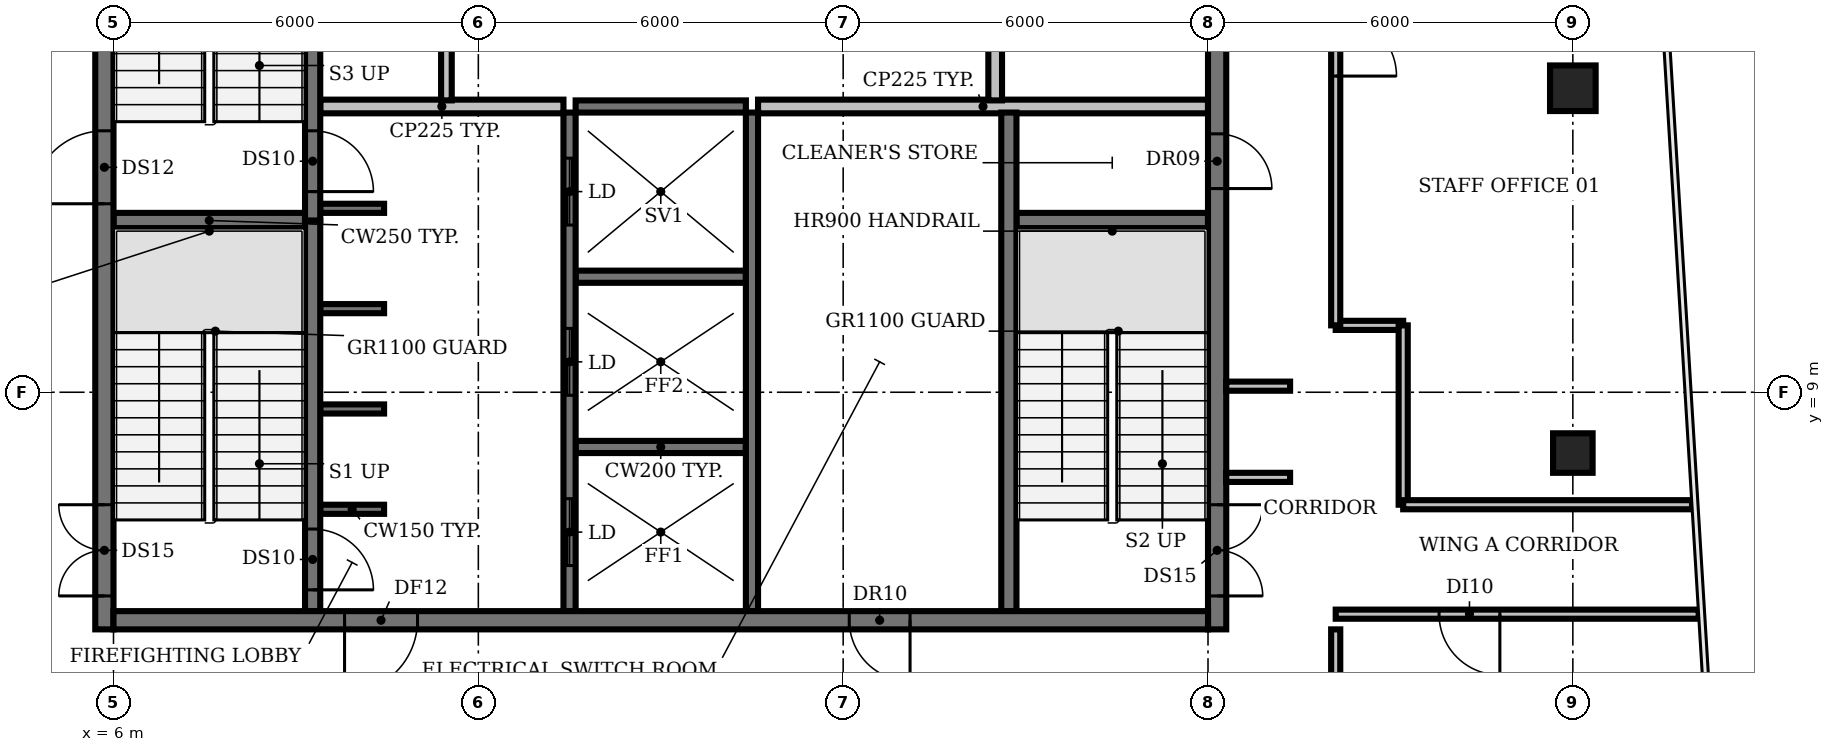
"""IFC4 building model, lengths in metres.
Left out: names, types, materials, properties, quantities, classifications, styles, units other than length and angle.
Written with IfcOpenShell. Run it as: python <this file> out.ifc"""

import sys

from ifc_helpers import new_model, si_unit, direction, frame, frame_2d, origin, origin_2d, place, context, subcontext, project, spatial, rectangle, circle, extrude, element, fill, save


model = new_model("IFC4")
c1 = context("Model", 3, precision=1e-05, world=origin(), true_north=direction((0.0, 1.0)))
c2 = subcontext(c1, "Body", "Model", "MODEL_VIEW")
j1 = project(units=[si_unit("LENGTHUNIT", "METRE"), si_unit("PLANEANGLEUNIT", "RADIAN")], contexts=[c1])
p1 = place(None, origin())
s1 = spatial("IfcSite", under=j1, at=p1, CompositionType="ELEMENT")
p2 = place(p1, origin())
s2 = spatial("IfcBuilding", under=s1, at=p2, CompositionType="ELEMENT")
p3 = place(p2, frame((0.0, 0.0, 318.8)))
s3 = spatial("IfcBuildingStorey", under=s2, at=p3, CompositionType="ELEMENT", Elevation=318.8)
p4 = place(p3, frame((30.0, 8.0, 0.0), z_axis=(0.0, 0.0, 1.0), x_axis=(1.0, 0.0, 0.0)))
e1 = element("IfcColumn", 1, at=p4, inside=s3, PredefinedType="COLUMN", context=c2, shape_type="SweptSolid", body=[
    extrude(rectangle(XDim=0.65, YDim=0.65, at=origin_2d()), origin(), (0.0, 0.0, 1.0), 3.9),
])
p5 = place(p3, frame((30.0, 14.0, 0.0), z_axis=(0.0, 0.0, 1.0), x_axis=(1.0, 0.0, 0.0)))
e2 = element("IfcColumn", 2, at=p5, inside=s3, PredefinedType="COLUMN", context=c2, shape_type="SweptSolid", body=[
    extrude(circle(Radius=0.375, at=origin_2d()), origin(), (0.0, 0.0, 1.0), 3.9),
])
p6 = place(p3, frame((9.4, 7.075, 0.0), z_axis=(0.0, 0.0, 1.0), x_axis=(1.0, 0.0, 0.0)))
e3 = element("IfcWall", 3, at=p6, inside=s3, PredefinedType="SHEAR", context=c2, shape_type="SweptSolid", body=[
    extrude(rectangle(XDim=1.05, YDim=0.15, at=frame_2d((0.525, 0.0))), origin(), (0.0, 0.0, 1.0), 3.9),
])
p7 = place(p3, frame((13.6, 8.1, 0.0), z_axis=(0.0, 0.0, 1.0), x_axis=(1.0, 0.0, 0.0)))
e4 = element("IfcWall", 4, at=p7, inside=s3, PredefinedType="SHEAR", context=c2, shape_type="SweptSolid", body=[
    extrude(rectangle(XDim=2.8, YDim=0.2, at=frame_2d((1.4, 0.0))), origin(), (0.0, 0.0, 1.0), 3.9),
])
for number, where, z_axis, x_axis in (
    (5, (9.4, 8.725, 0.0), (0.0, 0.0, 1.0), (1.0, 0.0, 0.0)),
    (6, (9.4, 10.375, 0.0), (0.0, 0.0, 1.0), (1.0, 0.0, 0.0)),
):
    element("IfcWall", number, at=place(p3, frame(where, z_axis=z_axis, x_axis=x_axis)), inside=s3, PredefinedType="SHEAR", context=c2, shape_type="SweptSolid", body=[
        extrude(rectangle(XDim=1.05, YDim=0.15, at=frame_2d((0.525, 0.0))), origin(), (0.0, 0.0, 1.0), 3.9),
    ])
p8 = place(p3, frame((13.6, 10.9, 0.0), z_axis=(0.0, 0.0, 1.0), x_axis=(1.0, 0.0, 0.0)))
e7 = element("IfcWall", 7, at=p8, inside=s3, PredefinedType="SHEAR", context=c2, shape_type="SweptSolid", body=[
    extrude(rectangle(XDim=2.8, YDim=0.2, at=frame_2d((1.4, 0.0))), origin(), (0.0, 0.0, 1.0), 3.9),
])
for number, where, z_axis, x_axis in (
    (8, (6.0, 11.825, 0.0), (0.0, 0.0, 1.0), (1.0, 0.0, 0.0)),
    (9, (20.85, 11.825, 0.0), (0.0, 0.0, 1.0), (1.0, 0.0, 0.0)),
):
    element("IfcWall", number, at=place(p3, frame(where, z_axis=z_axis, x_axis=x_axis)), inside=s3, PredefinedType="SHEAR", context=c2, shape_type="SweptSolid", body=[
        extrude(rectangle(XDim=3.15, YDim=0.25, at=frame_2d((1.575, 0.0))), origin(), (0.0, 0.0, 1.0), 3.9),
    ])
p9 = place(p3, frame((9.4, 12.025, 0.0), z_axis=(0.0, 0.0, 1.0), x_axis=(1.0, 0.0, 0.0)))
e10 = element("IfcWall", 10, at=p9, inside=s3, PredefinedType="SHEAR", context=c2, shape_type="SweptSolid", body=[
    extrude(rectangle(XDim=1.05, YDim=0.15, at=frame_2d((0.525, 0.0))), origin(), (0.0, 0.0, 1.0), 3.9),
])
p10 = place(p3, frame((9.4, 13.7, 0.0), z_axis=(0.0, 0.0, 1.0), x_axis=(1.0, 0.0, 0.0)))
e11 = element("IfcWall", 11, at=p10, inside=s3, PredefinedType="PARTITIONING", context=c2, shape_type="SweptSolid", body=[
    extrude(rectangle(XDim=4.0, YDim=0.225, at=frame_2d((2.0, 0.0))), origin(), (0.0, 0.0, 1.0), 3.9),
])
p11 = place(p3, frame((13.6, 13.7, 0.0), z_axis=(0.0, 0.0, 1.0), x_axis=(1.0, 0.0, 0.0)))
e12 = element("IfcWall", 12, at=p11, inside=s3, PredefinedType="SHEAR", context=c2, shape_type="SweptSolid", body=[
    extrude(rectangle(XDim=2.8, YDim=0.2, at=frame_2d((1.4, 0.0))), origin(), (0.0, 0.0, 1.0), 3.9),
])
p12 = place(p3, frame((16.6, 13.7, 0.0), z_axis=(0.0, 0.0, 1.0), x_axis=(1.0, 0.0, 0.0)))
e13 = element("IfcWall", 13, at=p12, inside=s3, PredefinedType="PARTITIONING", context=c2, shape_type="SweptSolid", body=[
    extrude(rectangle(XDim=7.4, YDim=0.225, at=frame_2d((3.7, 0.0))), origin(), (0.0, 0.0, 1.0), 3.9),
])
p13 = place(p3, frame((9.275, 11.825, 0.0), z_axis=(0.0, 0.0, 1.0), x_axis=(0.0, -1.0, 0.0)))
e14 = element("IfcWall", 14, at=p13, inside=s3, PredefinedType="SHEAR", context=c2, shape_type="SweptSolid", body=[
    extrude(rectangle(XDim=6.425, YDim=0.25, at=frame_2d((3.212, 0.0))), origin(), (0.0, 0.0, 1.0), 3.9),
])
p14 = place(p13, frame((5.075, 0.0, 0.0)))
e15 = element("IfcOpeningElement", 15, at=p14, cuts=e14, PredefinedType="OPENING", context=c2, shape_type="SweptSolid", body=[
    extrude(rectangle(XDim=1.0, YDim=2.1, at=frame_2d((0.5, 1.05))), frame((0.0, 0.135, 0.0), z_axis=(0.0, -1.0, 0.0), x_axis=(1.0, 0.0, 0.0)), (0.0, 0.0, 1.0), 0.27),
])
p15 = place(p3, frame((9.275, 18.375, 0.0), z_axis=(0.0, 0.0, 1.0), x_axis=(0.0, -1.0, 0.0)))
e16 = element("IfcWall", 16, at=p15, inside=s3, PredefinedType="SHEAR", context=c2, shape_type="SweptSolid", body=[
    extrude(rectangle(XDim=6.55, YDim=0.25, at=frame_2d((3.275, 0.0))), origin(), (0.0, 0.0, 1.0), 3.9),
])
p16 = place(p15, frame((5.075, 0.0, 0.0)))
e17 = element("IfcOpeningElement", 17, at=p16, cuts=e16, PredefinedType="OPENING", context=c2, shape_type="SweptSolid", body=[
    extrude(rectangle(XDim=1.0, YDim=2.1, at=frame_2d((0.5, 1.05))), frame((0.0, 0.135, 0.0), z_axis=(0.0, -1.0, 0.0), x_axis=(1.0, 0.0, 0.0)), (0.0, 0.0, 1.0), 0.27),
])
p17 = place(p3, frame((11.475, 13.8, 0.0), z_axis=(0.0, 0.0, 1.0), x_axis=(0.0, 1.0, 0.0)))
e18 = element("IfcWall", 18, at=p17, inside=s3, PredefinedType="PARTITIONING", context=c2, shape_type="SweptSolid", body=[
    extrude(rectangle(XDim=2.6, YDim=0.175, at=frame_2d((1.3, 0.0))), origin(), (0.0, 0.0, 1.0), 3.9),
])
p18 = place(p3, frame((13.5, 5.4, 0.0), z_axis=(0.0, 0.0, 1.0), x_axis=(0.0, 1.0, 0.0)))
e19 = element("IfcWall", 19, at=p18, inside=s3, PredefinedType="SHEAR", context=c2, shape_type="SweptSolid", body=[
    extrude(rectangle(XDim=8.2, YDim=0.2, at=frame_2d((4.1, 0.0))), origin(), (0.0, 0.0, 1.0), 3.9),
])
p19 = place(p18, frame((0.75, 0.0, 0.0)))
e20 = element("IfcOpeningElement", 20, at=p19, cuts=e19, PredefinedType="OPENING", context=c2, shape_type="SweptSolid", body=[
    extrude(rectangle(XDim=1.1, YDim=2.1, at=frame_2d((0.55, 1.05))), frame((0.0, 0.11, 0.0), z_axis=(0.0, -1.0, 0.0), x_axis=(1.0, 0.0, 0.0)), (0.0, 0.0, 1.0), 0.22),
])
p20 = place(p18, frame((3.55, 0.0, 0.0)))
e21 = element("IfcOpeningElement", 21, at=p20, cuts=e19, PredefinedType="OPENING", context=c2, shape_type="SweptSolid", body=[
    extrude(rectangle(XDim=1.1, YDim=2.1, at=frame_2d((0.55, 1.05))), frame((0.0, 0.11, 0.0), z_axis=(0.0, -1.0, 0.0), x_axis=(1.0, 0.0, 0.0)), (0.0, 0.0, 1.0), 0.22),
])
p21 = place(p18, frame((6.35, 0.0, 0.0)))
e22 = element("IfcOpeningElement", 22, at=p21, cuts=e19, PredefinedType="OPENING", context=c2, shape_type="SweptSolid", body=[
    extrude(rectangle(XDim=1.1, YDim=2.1, at=frame_2d((0.55, 1.05))), frame((0.0, 0.11, 0.0), z_axis=(0.0, -1.0, 0.0), x_axis=(1.0, 0.0, 0.0)), (0.0, 0.0, 1.0), 0.22),
])
p22 = place(p3, frame((16.5, 5.4, 0.0), z_axis=(0.0, 0.0, 1.0), x_axis=(0.0, 1.0, 0.0)))
e23 = element("IfcWall", 23, at=p22, inside=s3, PredefinedType="SHEAR", context=c2, shape_type="SweptSolid", body=[
    extrude(rectangle(XDim=8.2, YDim=0.2, at=frame_2d((4.1, 0.0))), origin(), (0.0, 0.0, 1.0), 3.9),
])
p23 = place(p3, frame((20.5, 13.8, 0.0), z_axis=(0.0, 0.0, 1.0), x_axis=(0.0, 1.0, 0.0)))
e24 = element("IfcWall", 24, at=p23, inside=s3, PredefinedType="PARTITIONING", context=c2, shape_type="SweptSolid", body=[
    extrude(rectangle(XDim=2.6, YDim=0.225, at=frame_2d((1.3, 0.0))), origin(), (0.0, 0.0, 1.0), 3.9),
])
p24 = place(p3, frame((20.725, 5.4, 0.0), z_axis=(0.0, 0.0, 1.0), x_axis=(0.0, 1.0, 0.0)))
e25 = element("IfcWall", 25, at=p24, inside=s3, PredefinedType="SHEAR", context=c2, shape_type="SweptSolid", body=[
    extrude(rectangle(XDim=8.2, YDim=0.25, at=frame_2d((4.1, 0.0))), origin(), (0.0, 0.0, 1.0), 3.9),
])
p25 = place(p3, frame((5.85, 5.1, 0.0), z_axis=(0.0, 0.0, 1.0), x_axis=(0.0, 1.0, 0.0)))
e26 = element("IfcWall", 26, at=p25, inside=s3, PredefinedType="SHEAR", context=c2, shape_type="SweptSolid", body=[
    extrude(rectangle(XDim=20.0, YDim=0.3, at=frame_2d((10.0, 0.0))), origin(), (0.0, 0.0, 1.0), 3.9),
])
p26 = place(p25, frame((0.55, 0.0, 0.0)))
e27 = element("IfcOpeningElement", 27, at=p26, cuts=e26, PredefinedType="OPENING", context=c2, shape_type="SweptSolid", body=[
    extrude(rectangle(XDim=1.5, YDim=2.1, at=frame_2d((0.75, 1.05))), frame((0.0, 0.16, 0.0), z_axis=(0.0, -1.0, 0.0), x_axis=(1.0, 0.0, 0.0)), (0.0, 0.0, 1.0), 0.32),
])
p27 = place(p25, frame((7.0, 0.0, 0.0)))
e28 = element("IfcOpeningElement", 28, at=p27, cuts=e26, PredefinedType="OPENING", context=c2, shape_type="SweptSolid", body=[
    extrude(rectangle(XDim=1.2, YDim=2.1, at=frame_2d((0.6, 1.05))), frame((0.0, 0.16, 0.0), z_axis=(0.0, -1.0, 0.0), x_axis=(1.0, 0.0, 0.0)), (0.0, 0.0, 1.0), 0.32),
])
p28 = place(p25, frame((13.55, 0.0, 0.0)))
e29 = element("IfcOpeningElement", 29, at=p28, cuts=e26, PredefinedType="OPENING", context=c2, shape_type="SweptSolid", body=[
    extrude(rectangle(XDim=1.2, YDim=2.1, at=frame_2d((0.6, 1.05))), frame((0.0, 0.16, 0.0), z_axis=(0.0, -1.0, 0.0), x_axis=(1.0, 0.0, 0.0)), (0.0, 0.0, 1.0), 0.32),
])
p29 = place(p3, frame((24.15, 25.705, 0.0), z_axis=(0.0, 0.0, 1.0), x_axis=(0.0, -1.0, 0.0)))
e30 = element("IfcWall", 30, at=p29, inside=s3, PredefinedType="SHEAR", context=c2, shape_type="SweptSolid", body=[
    extrude(rectangle(XDim=20.605, YDim=0.3, at=frame_2d((10.302, 0.0))), origin(), (0.0, 0.0, 1.0), 3.9),
])
p30 = place(p29, frame((18.555, 0.0, 0.0)))
e31 = element("IfcOpeningElement", 31, at=p30, cuts=e30, PredefinedType="OPENING", context=c2, shape_type="SweptSolid", body=[
    extrude(rectangle(XDim=1.5, YDim=2.1, at=frame_2d((0.75, 1.05))), frame((0.0, 0.16, 0.0), z_axis=(0.0, -1.0, 0.0), x_axis=(1.0, 0.0, 0.0)), (0.0, 0.0, 1.0), 0.32),
])
p31 = place(p29, frame((12.455, 0.0, 0.0)))
e32 = element("IfcOpeningElement", 32, at=p31, cuts=e30, PredefinedType="OPENING", context=c2, shape_type="SweptSolid", body=[
    extrude(rectangle(XDim=0.9, YDim=2.1, at=frame_2d((0.45, 1.05))), frame((0.0, 0.16, 0.0), z_axis=(0.0, -1.0, 0.0), x_axis=(1.0, 0.0, 0.0)), (0.0, 0.0, 1.0), 0.32),
])
p32 = place(p29, frame((6.455, 0.0, 0.0)))
e33 = element("IfcOpeningElement", 33, at=p32, cuts=e30, PredefinedType="OPENING", context=c2, shape_type="SweptSolid", body=[
    extrude(rectangle(XDim=2.0, YDim=2.1, at=frame_2d((1.0, 1.05))), frame((0.0, 0.16, 0.0), z_axis=(0.0, -1.0, 0.0), x_axis=(1.0, 0.0, 0.0)), (0.0, 0.0, 1.0), 0.32),
])
p33 = place(p3, frame((24.0, 5.25, 0.0), z_axis=(0.0, 0.0, 1.0), x_axis=(-1.0, 0.0, 0.0)))
e34 = element("IfcWall", 34, at=p33, inside=s3, PredefinedType="SHEAR", context=c2, shape_type="SweptSolid", body=[
    extrude(rectangle(XDim=18.0, YDim=0.3, at=frame_2d((9.0, 0.0))), origin(), (0.0, 0.0, 1.0), 3.9),
])
p34 = place(p33, frame((13.0, 0.0, 0.0)))
e35 = element("IfcOpeningElement", 35, at=p34, cuts=e34, PredefinedType="OPENING", context=c2, shape_type="SweptSolid", body=[
    extrude(rectangle(XDim=1.2, YDim=2.1, at=frame_2d((0.6, 1.05))), frame((0.0, 0.16, 0.0), z_axis=(0.0, -1.0, 0.0), x_axis=(1.0, 0.0, 0.0)), (0.0, 0.0, 1.0), 0.32),
])
p35 = place(p33, frame((4.9, 0.0, 0.0)))
e36 = element("IfcOpeningElement", 36, at=p35, cuts=e34, PredefinedType="OPENING", context=c2, shape_type="SweptSolid", body=[
    extrude(rectangle(XDim=1.0, YDim=2.1, at=frame_2d((0.5, 1.05))), frame((0.0, 0.16, 0.0), z_axis=(0.0, -1.0, 0.0), x_axis=(1.0, 0.0, 0.0)), (0.0, 0.0, 1.0), 0.32),
])
for number, where, z_axis, x_axis in (
    (37, (24.3, 7.6, 0.0), (0.0, 0.0, 1.0), (1.0, 0.0, 0.0)),
    (38, (24.3, 9.1, 0.0), (0.0, 0.0, 1.0), (1.0, 0.0, 0.0)),
):
    element("IfcWall", number, at=place(p3, frame(where, z_axis=z_axis, x_axis=x_axis)), inside=s3, PredefinedType="PARTITIONING", context=c2, shape_type="SweptSolid", body=[
        extrude(rectangle(XDim=1.05, YDim=0.15, at=frame_2d((0.525, 0.0))), origin(), (0.0, 0.0, 1.0), 2.95),
    ])
p36 = place(p3, frame((26.1, 2.1, 0.0), z_axis=(0.0, 0.0, 1.0), x_axis=(0.0, 1.0, 0.0)))
e39 = element("IfcWall", 39, at=p36, inside=s3, PredefinedType="PARTITIONING", context=c2, shape_type="SweptSolid", body=[
    extrude(rectangle(XDim=3.0, YDim=0.15, at=frame_2d((1.5, 0.0))), origin(), (0.0, 0.0, 1.0), 2.95),
])
p37 = place(p3, frame((26.1, 10.1, 0.0), z_axis=(0.0, 0.0, 1.0), x_axis=(1.0, 0.0, 0.0)))
e40 = element("IfcWall", 40, at=p37, inside=s3, PredefinedType="PARTITIONING", context=c2, shape_type="SweptSolid", body=[
    extrude(rectangle(XDim=1.11, YDim=0.15, at=frame_2d((0.555, 0.0))), origin(), (0.0, 0.0, 1.0), 2.95),
])
p38 = place(p3, frame((26.1, 19.58, 0.0), z_axis=(0.0, 0.0, 1.0), x_axis=(0.0, -1.0, 0.0)))
e41 = element("IfcWall", 41, at=p38, inside=s3, PredefinedType="PARTITIONING", context=c2, shape_type="SweptSolid", body=[
    extrude(rectangle(XDim=9.48, YDim=0.15, at=frame_2d((4.74, 0.0))), origin(), (0.0, 0.0, 1.0), 2.95),
])
p39 = place(p38, frame((4.38, 0.0, 0.0)))
e42 = element("IfcOpeningElement", 42, at=p39, cuts=e41, PredefinedType="OPENING", context=c2, shape_type="SweptSolid", body=[
    extrude(rectangle(XDim=1.0, YDim=2.1, at=frame_2d((0.5, 1.05))), frame((0.0, 0.085, 0.0), z_axis=(0.0, -1.0, 0.0), x_axis=(1.0, 0.0, 0.0)), (0.0, 0.0, 1.0), 0.17),
])
p40 = place(p3, frame((27.21, 7.15, 0.0), z_axis=(0.0, 0.0, 1.0), x_axis=(0.0, 1.0, 0.0)))
e43 = element("IfcWall", 43, at=p40, inside=s3, PredefinedType="PARTITIONING", context=c2, shape_type="SweptSolid", body=[
    extrude(rectangle(XDim=2.95, YDim=0.15, at=frame_2d((1.475, 0.0))), origin(), (0.0, 0.0, 1.0), 2.95),
])
p41 = place(p3, frame((27.21, 7.15, 0.0), z_axis=(0.0, 0.0, 1.0), x_axis=(1.0, 0.0, 0.0)))
e44 = element("IfcWall", 44, at=p41, inside=s3, PredefinedType="PARTITIONING", context=c2, shape_type="SweptSolid", body=[
    extrude(rectangle(XDim=4.75, YDim=0.15, at=frame_2d((2.375, 0.0))), origin(), (0.0, 0.0, 1.0), 2.95),
])
p42 = place(p3, frame((32.07, 5.35, 0.0), z_axis=(0.0, 0.0, 1.0), x_axis=(-1.0, 0.0, 0.0)))
e45 = element("IfcWall", 45, at=p42, inside=s3, PredefinedType="PARTITIONING", context=c2, shape_type="SweptSolid", body=[
    extrude(rectangle(XDim=5.97, YDim=0.15, at=frame_2d((2.985, 0.0))), origin(), (0.0, 0.0, 1.0), 2.95),
])
p43 = place(p42, frame((3.27, 0.0, 0.0)))
e46 = element("IfcOpeningElement", 46, at=p43, cuts=e45, PredefinedType="OPENING", context=c2, shape_type="SweptSolid", body=[
    extrude(rectangle(XDim=1.0, YDim=2.1, at=frame_2d((0.5, 1.05))), frame((0.0, 0.085, 0.0), z_axis=(0.0, -1.0, 0.0), x_axis=(1.0, 0.0, 0.0)), (0.0, 0.0, 1.0), 0.17),
])
p44 = place(p14, origin())
e47 = element("IfcDoor", 47, at=p44, inside=s3, OperationType="SINGLE_SWING_RIGHT", PredefinedType="DOOR", context=c2, shape_type="SweptSolid", body=[
    extrude(rectangle(XDim=1.0, YDim=2.1, at=frame_2d((0.5, 1.05))), frame((0.0, 0.025, 0.0), z_axis=(0.0, -1.0, 0.0), x_axis=(1.0, 0.0, 0.0)), (0.0, 0.0, 1.0), 0.05),
])
fill(e15, e47)
p45 = place(p16, origin())
e48 = element("IfcDoor", 48, at=p45, inside=s3, OperationType="SINGLE_SWING_RIGHT", PredefinedType="DOOR", context=c2, shape_type="SweptSolid", body=[
    extrude(rectangle(XDim=1.0, YDim=2.1, at=frame_2d((0.5, 1.05))), frame((0.0, 0.025, 0.0), z_axis=(0.0, -1.0, 0.0), x_axis=(1.0, 0.0, 0.0)), (0.0, 0.0, 1.0), 0.05),
])
fill(e17, e48)
p46 = place(p19, origin())
e49 = element("IfcDoor", 49, at=p46, inside=s3, OperationType="DOUBLE_DOOR_SLIDING", PredefinedType="DOOR", context=c2, shape_type="SweptSolid", body=[
    extrude(rectangle(XDim=1.1, YDim=2.1, at=frame_2d((0.55, 1.05))), frame((0.0, 0.025, 0.0), z_axis=(0.0, -1.0, 0.0), x_axis=(1.0, 0.0, 0.0)), (0.0, 0.0, 1.0), 0.05),
])
fill(e20, e49)
p47 = place(p20, origin())
e50 = element("IfcDoor", 50, at=p47, inside=s3, OperationType="DOUBLE_DOOR_SLIDING", PredefinedType="DOOR", context=c2, shape_type="SweptSolid", body=[
    extrude(rectangle(XDim=1.1, YDim=2.1, at=frame_2d((0.55, 1.05))), frame((0.0, 0.025, 0.0), z_axis=(0.0, -1.0, 0.0), x_axis=(1.0, 0.0, 0.0)), (0.0, 0.0, 1.0), 0.05),
])
fill(e21, e50)
p48 = place(p21, origin())
e51 = element("IfcDoor", 51, at=p48, inside=s3, OperationType="DOUBLE_DOOR_SLIDING", PredefinedType="DOOR", context=c2, shape_type="SweptSolid", body=[
    extrude(rectangle(XDim=1.1, YDim=2.1, at=frame_2d((0.55, 1.05))), frame((0.0, 0.025, 0.0), z_axis=(0.0, -1.0, 0.0), x_axis=(1.0, 0.0, 0.0)), (0.0, 0.0, 1.0), 0.05),
])
fill(e22, e51)
p49 = place(p26, origin())
e52 = element("IfcDoor", 52, at=p49, inside=s3, OperationType="DOUBLE_DOOR_SINGLE_SWING", PredefinedType="DOOR", context=c2, shape_type="SweptSolid", body=[
    extrude(rectangle(XDim=1.5, YDim=2.1, at=frame_2d((0.75, 1.05))), frame((0.0, 0.025, 0.0), z_axis=(0.0, -1.0, 0.0), x_axis=(1.0, 0.0, 0.0)), (0.0, 0.0, 1.0), 0.05),
])
fill(e27, e52)
p50 = place(p27, origin())
e53 = element("IfcDoor", 53, at=p50, inside=s3, OperationType="SINGLE_SWING_LEFT", PredefinedType="DOOR", context=c2, shape_type="SweptSolid", body=[
    extrude(rectangle(XDim=1.2, YDim=2.1, at=frame_2d((0.6, 1.05))), frame((0.0, 0.025, 0.0), z_axis=(0.0, -1.0, 0.0), x_axis=(1.0, 0.0, 0.0)), (0.0, 0.0, 1.0), 0.05),
])
fill(e28, e53)
p51 = place(p30, origin())
e54 = element("IfcDoor", 54, at=p51, inside=s3, OperationType="DOUBLE_DOOR_SINGLE_SWING", PredefinedType="DOOR", context=c2, shape_type="SweptSolid", body=[
    extrude(rectangle(XDim=1.5, YDim=2.1, at=frame_2d((0.75, 1.05))), frame((0.0, 0.025, 0.0), z_axis=(0.0, -1.0, 0.0), x_axis=(1.0, 0.0, 0.0)), (0.0, 0.0, 1.0), 0.05),
])
fill(e31, e54)
p52 = place(p31, origin())
e55 = element("IfcDoor", 55, at=p52, inside=s3, OperationType="SINGLE_SWING_RIGHT", PredefinedType="DOOR", context=c2, shape_type="SweptSolid", body=[
    extrude(rectangle(XDim=0.9, YDim=2.1, at=frame_2d((0.45, 1.05))), frame((0.0, 0.025, 0.0), z_axis=(0.0, -1.0, 0.0), x_axis=(1.0, 0.0, 0.0)), (0.0, 0.0, 1.0), 0.05),
])
fill(e32, e55)
p53 = place(p34, origin())
e56 = element("IfcDoor", 56, at=p53, inside=s3, OperationType="SINGLE_SWING_RIGHT", PredefinedType="DOOR", context=c2, shape_type="SweptSolid", body=[
    extrude(rectangle(XDim=1.2, YDim=2.1, at=frame_2d((0.6, 1.05))), frame((0.0, 0.025, 0.0), z_axis=(0.0, -1.0, 0.0), x_axis=(1.0, 0.0, 0.0)), (0.0, 0.0, 1.0), 0.05),
])
fill(e35, e56)
p54 = place(p35, origin())
e57 = element("IfcDoor", 57, at=p54, inside=s3, OperationType="SINGLE_SWING_LEFT", PredefinedType="DOOR", context=c2, shape_type="SweptSolid", body=[
    extrude(rectangle(XDim=1.0, YDim=2.1, at=frame_2d((0.5, 1.05))), frame((0.0, 0.025, 0.0), z_axis=(0.0, -1.0, 0.0), x_axis=(1.0, 0.0, 0.0)), (0.0, 0.0, 1.0), 0.05),
])
fill(e36, e57)
p55 = place(p39, origin())
e58 = element("IfcDoor", 58, at=p55, inside=s3, OperationType="SINGLE_SWING_RIGHT", PredefinedType="DOOR", context=c2, shape_type="SweptSolid", body=[
    extrude(rectangle(XDim=1.0, YDim=2.1, at=frame_2d((0.5, 1.05))), frame((0.0, 0.025, 0.0), z_axis=(0.0, -1.0, 0.0), x_axis=(1.0, 0.0, 0.0)), (0.0, 0.0, 1.0), 0.05),
])
fill(e42, e58)
p56 = place(p43, origin())
e59 = element("IfcDoor", 59, at=p56, inside=s3, OperationType="SINGLE_SWING_LEFT", PredefinedType="DOOR", context=c2, shape_type="SweptSolid", body=[
    extrude(rectangle(XDim=1.0, YDim=2.1, at=frame_2d((0.5, 1.05))), frame((0.0, 0.025, 0.0), z_axis=(0.0, -1.0, 0.0), x_axis=(1.0, 0.0, 0.0)), (0.0, 0.0, 1.0), 0.05),
])
fill(e46, e59)
save(model, sys.argv[1])
